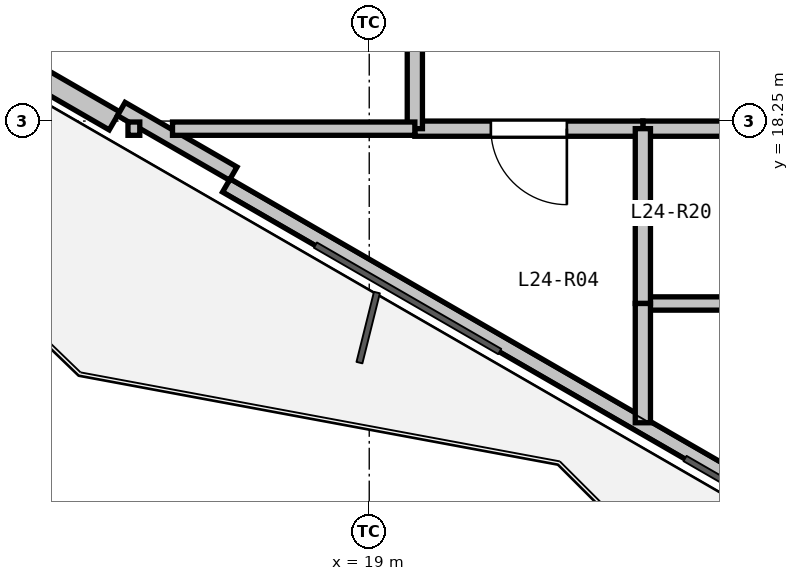
"""IFC4 building model, lengths in metres.
Left out: names, types, materials, properties, quantities, classifications, styles, units other than length and angle.
Written with IfcOpenShell. Run it as: python <this file> out.ifc"""

import sys

from ifc_helpers import new_model, si_unit, direction, frame, frame_2d, origin, place, context, subcontext, project, spatial, rectangle, extrude, element, fill, save


model = new_model("IFC4")
c1 = context("Model", 3, precision=1e-05, world=origin(), true_north=direction((0.0, 1.0)))
c2 = subcontext(c1, "Body", "Model", "MODEL_VIEW")
j1 = project(units=[si_unit("LENGTHUNIT", "METRE"), si_unit("PLANEANGLEUNIT", "RADIAN")], contexts=[c1])
p1 = place(None, origin())
s1 = spatial("IfcSite", under=j1, at=p1, CompositionType="ELEMENT")
p2 = place(p1, origin())
s2 = spatial("IfcBuilding", under=s1, at=p2, CompositionType="ELEMENT")
p3 = place(p2, frame((0.0, 0.0, 90.0)))
s3 = spatial("IfcBuildingStorey", under=s2, at=p3, CompositionType="ELEMENT", Elevation=90.0)
p4 = place(p3, frame((26.845, 11.788, 0.0), z_axis=(0.0, 0.0, 1.0), x_axis=(-0.866027010039, 0.499997217876, 0.0)))
e1 = element("IfcWall", 1, at=p4, inside=s3, PredefinedType="PARAPET", context=c2, shape_type="SweptSolid", body=[
    extrude(rectangle(XDim=11.229, YDim=0.2, at=frame_2d((5.615, 0.0))), origin(), (0.0, 0.0, 1.0), 0.2),
])
p5 = place(p3, frame((15.648, 18.253, 0.0), z_axis=(0.0, 0.0, 1.0), x_axis=(-0.866023023012, 0.500004123596, 0.0)))
e2 = element("IfcWall", 2, at=p5, inside=s3, PredefinedType="SOLIDWALL", context=c2, shape_type="SweptSolid", body=[
    extrude(rectangle(XDim=11.93, YDim=0.275, at=frame_2d((5.965, 0.0))), origin(), (0.0, 0.0, 1.0), 2.67),
])
p6 = place(p5, frame((7.725, 0.0, 0.9)))
e3 = element("IfcOpeningElement", 3, at=p6, cuts=e2, PredefinedType="OPENING", context=c2, shape_type="SweptSolid", body=[
    extrude(rectangle(XDim=1.2, YDim=1.5, at=frame_2d((0.6, 0.75))), frame((0.0, 0.147, 0.0), z_axis=(0.0, -1.0, 0.0), x_axis=(1.0, 0.0, 0.0)), (0.0, 0.0, 1.0), 0.295),
])
p7 = place(p3, frame((17.21, 17.559, 0.0), z_axis=(0.0, 0.0, 1.0), x_axis=(-0.866025371046, 0.500000056704, 0.0)))
e4 = element("IfcWall", 4, at=p7, inside=s3, PredefinedType="PARAPET", context=c2, shape_type="SweptSolid", body=[
    extrude(rectangle(XDim=1.7, YDim=0.2, at=frame_2d((0.85, 0.0))), origin(), (0.0, 0.0, 1.0), 2.67),
])
p8 = place(p3, frame((25.0, 18.15, 0.0), z_axis=(0.0, 0.0, 1.0), x_axis=(-1.0, 0.0, 0.0)))
e5 = element("IfcWall", 5, at=p8, inside=s3, PredefinedType="PARTITIONING", context=c2, shape_type="SweptSolid", body=[
    extrude(rectangle(XDim=2.4, YDim=0.2, at=frame_2d((1.2, 0.0))), origin(), (0.0, 0.0, 1.0), 2.423),
])
p9 = place(p3, frame((22.6, 18.15, 0.0), z_axis=(0.0, 0.0, 1.0), x_axis=(-1.0, 0.0, 0.0)))
e6 = element("IfcWall", 6, at=p9, inside=s3, PredefinedType="PARTITIONING", context=c2, shape_type="SweptSolid", body=[
    extrude(rectangle(XDim=3.0, YDim=0.2, at=frame_2d((1.5, 0.0))), origin(), (0.0, 0.0, 1.0), 3.05),
])
p10 = place(p9, frame((1.0, 0.0, 0.0)))
e7 = element("IfcOpeningElement", 7, at=p10, cuts=e6, PredefinedType="OPENING", context=c2, shape_type="SweptSolid", body=[
    extrude(rectangle(XDim=1.0, YDim=2.15, at=frame_2d((0.5, 1.075))), frame((0.0, 0.11, 0.0), z_axis=(0.0, -1.0, 0.0), x_axis=(1.0, 0.0, 0.0)), (0.0, 0.0, 1.0), 0.22),
])
p11 = place(p3, frame((19.6, 18.15, 0.0), z_axis=(0.0, 0.0, 1.0), x_axis=(0.0, 1.0, 0.0)))
e8 = element("IfcWall", 8, at=p11, inside=s3, PredefinedType="PARTITIONING", context=c2, shape_type="SweptSolid", body=[
    extrude(rectangle(XDim=3.35, YDim=0.2, at=frame_2d((1.675, 0.0))), origin(), (0.0, 0.0, 1.0), 2.423),
])
p12 = place(p11, frame((1.25, 0.0, 0.0)))
e9 = element("IfcOpeningElement", 9, at=p12, cuts=e8, PredefinedType="OPENING", context=c2, shape_type="SweptSolid", body=[
    extrude(rectangle(XDim=0.85, YDim=2.1, at=frame_2d((0.425, 1.05))), frame((0.0, 0.11, 0.0), z_axis=(0.0, -1.0, 0.0), x_axis=(1.0, 0.0, 0.0)), (0.0, 0.0, 1.0), 0.22),
])
p13 = place(p3, frame((19.6, 18.15, 0.0), z_axis=(0.0, 0.0, 1.0), x_axis=(-1.0, 0.0, 0.0)))
e10 = element("IfcWall", 10, at=p13, inside=s3, PredefinedType="PLUMBINGWALL", context=c2, shape_type="SweptSolid", body=[
    extrude(rectangle(XDim=3.188, YDim=0.175, at=frame_2d((1.594, 0.0))), origin(), (0.0, 0.0, 1.0), 2.365),
])
p14 = place(p3, frame((15.981, 18.15, 0.0), z_axis=(0.0, 0.0, 1.0), x_axis=(-1.0, 0.0, 0.0)))
e11 = element("IfcWall", 11, at=p14, inside=s3, PredefinedType="PLUMBINGWALL", context=c2, shape_type="SweptSolid", body=[
    extrude(rectangle(XDim=0.155, YDim=0.175, at=frame_2d((0.078, 0.0))), origin(), (0.0, 0.0, 1.0), 3.05),
])
p15 = place(p3, frame((25.0, 15.85, 0.0), z_axis=(0.0, 0.0, 1.0), x_axis=(-1.0, 0.0, 0.0)))
e12 = element("IfcWall", 12, at=p15, inside=s3, PredefinedType="PLUMBINGWALL", context=c2, shape_type="SweptSolid", body=[
    extrude(rectangle(XDim=2.4, YDim=0.175, at=frame_2d((1.2, 0.0))), origin(), (0.0, 0.0, 1.0), 3.05),
])
p16 = place(p3, frame((22.6, 15.85, 0.0), z_axis=(0.0, 0.0, 1.0), x_axis=(0.0, 1.0, 0.0)))
e13 = element("IfcWall", 13, at=p16, inside=s3, PredefinedType="PARTITIONING", context=c2, shape_type="SweptSolid", body=[
    extrude(rectangle(XDim=2.3, YDim=0.2, at=frame_2d((1.15, 0.0))), origin(), (0.0, 0.0, 1.0), 3.05),
])
p17 = place(p3, frame((22.6, 15.85, 0.0), z_axis=(0.0, 0.0, 1.0), x_axis=(0.0, -1.0, 0.0)))
e14 = element("IfcWall", 14, at=p17, inside=s3, PredefinedType="PARTITIONING", context=c2, shape_type="SweptSolid", body=[
    extrude(rectangle(XDim=1.569, YDim=0.2, at=frame_2d((0.785, 0.0))), origin(), (0.0, 0.0, 1.0), 2.365),
])
p18 = place(p10, origin())
e15 = element("IfcDoor", 15, at=p18, inside=s3, OperationType="SINGLE_SWING_LEFT", PredefinedType="DOOR", context=c2, shape_type="SweptSolid", body=[
    extrude(rectangle(XDim=1.0, YDim=2.15, at=frame_2d((0.5, 1.075))), frame((0.0, 0.025, 0.0), z_axis=(0.0, -1.0, 0.0), x_axis=(1.0, 0.0, 0.0)), (0.0, 0.0, 1.0), 0.05),
])
fill(e7, e15)
save(model, sys.argv[1])
